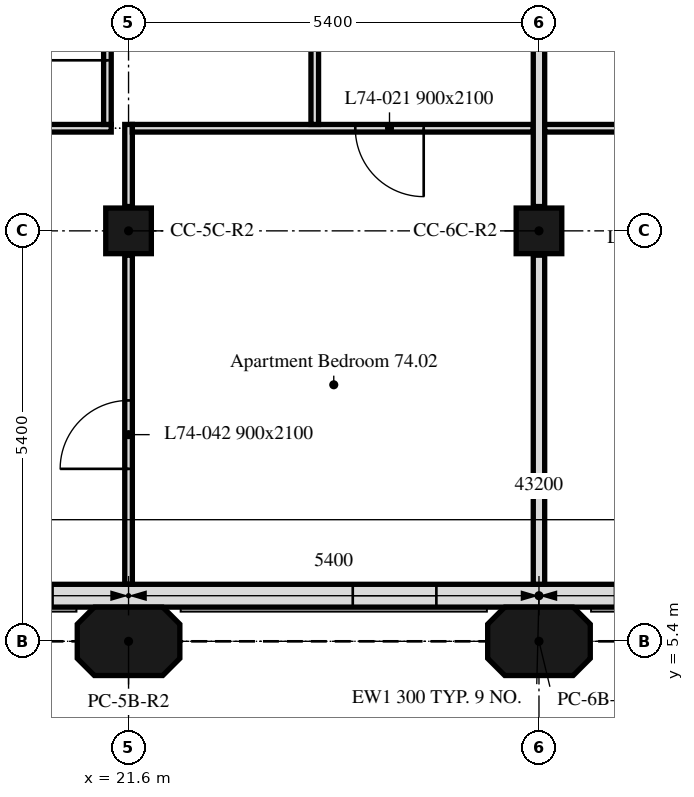
"""IFC4 building model, lengths in metres.
Left out: names, types, materials, properties, quantities, classifications, styles, units other than length and angle.
Written with IfcOpenShell. Run it as: python <this file> out.ifc"""

import sys

from ifc_helpers import new_model, si_unit, direction, frame, frame_2d, origin, origin_2d, place, context, subcontext, project, spatial, polyline, rectangle, outline, extrude, element, fill, save


model = new_model("IFC4")
c1 = context("Model", 3, precision=1e-05, world=origin(), true_north=direction((0.0, 1.0)))
c2 = subcontext(c1, "Body", "Model", "MODEL_VIEW")
j1 = project(units=[si_unit("LENGTHUNIT", "METRE"), si_unit("PLANEANGLEUNIT", "RADIAN")], contexts=[c1])
p1 = place(None, origin())
s1 = spatial("IfcSite", under=j1, at=p1, CompositionType="ELEMENT")
p2 = place(p1, origin())
s2 = spatial("IfcBuilding", under=s1, at=p2, CompositionType="ELEMENT")
p3 = place(p2, frame((0.0, 0.0, 298.3)))
s3 = spatial("IfcBuildingStorey", under=s2, at=p3, CompositionType="ELEMENT", Elevation=298.3)
for number, where, z_axis, x_axis in (
    (1, (21.6, 5.4, 0.0), (0.0, 0.0, 1.0), (1.0, 0.0, 0.0)),
    (2, (27.0, 5.4, 0.0), (0.0, 0.0, 1.0), (1.0, 0.0, 0.0)),
):
    element("IfcColumn", number, at=place(p3, frame(where, z_axis=z_axis, x_axis=x_axis)), inside=s3, PredefinedType="COLUMN", context=c2, shape_type="SweptSolid", body=[
        extrude(outline(polyline([(-0.45, -0.45), (0.45, -0.45), (0.675, -0.225), (0.675, 0.225), (0.45, 0.45), (-0.45, 0.45), (-0.675, 0.225), (-0.675, -0.225), (-0.45, -0.45)])), origin(), (0.0, 0.0, 1.0), 3.0),
    ])
for number, where, z_axis, x_axis in (
    (3, (21.6, 10.8, 0.0), (0.0, 0.0, 1.0), (1.0, 0.0, 0.0)),
    (4, (27.0, 10.8, 0.0), (0.0, 0.0, 1.0), (1.0, 0.0, 0.0)),
):
    element("IfcColumn", number, at=place(p3, frame(where, z_axis=z_axis, x_axis=x_axis)), inside=s3, PredefinedType="COLUMN", context=c2, shape_type="SweptSolid", body=[
        extrude(rectangle(XDim=0.6, YDim=0.6, at=origin_2d()), origin(), (0.0, 0.0, 1.0), 3.0),
    ])
p4 = place(p3, frame((10.986, 6.0, 0.0), z_axis=(0.0, 0.0, 1.0), x_axis=(1.0, 0.0, 0.0)))
e5 = element("IfcWall", 5, at=p4, inside=s3, PredefinedType="SOLIDWALL", context=c2, shape_type="SweptSolid", body=[
    extrude(rectangle(XDim=32.027, YDim=0.3, at=frame_2d((16.014, 0.0))), origin(), (0.0, 0.0, 1.0), 3.0),
])
p5 = place(p4, frame((2.764, 0.0, 0.9)))
e6 = element("IfcOpeningElement", 6, at=p5, cuts=e5, PredefinedType="OPENING", context=c2, shape_type="SweptSolid", body=[
    extrude(rectangle(XDim=1.1, YDim=1.7, at=frame_2d((0.55, 0.85))), frame((0.0, 0.16, 0.0), z_axis=(0.0, -1.0, 0.0), x_axis=(1.0, 0.0, 0.0)), (0.0, 0.0, 1.0), 0.32),
])
p6 = place(p4, frame((6.214, 0.0, 0.9)))
e7 = element("IfcOpeningElement", 7, at=p6, cuts=e5, PredefinedType="OPENING", context=c2, shape_type="SweptSolid", body=[
    extrude(rectangle(XDim=3.4, YDim=1.7, at=frame_2d((1.7, 0.85))), frame((0.0, 0.16, 0.0), z_axis=(0.0, -1.0, 0.0), x_axis=(1.0, 0.0, 0.0)), (0.0, 0.0, 1.0), 0.32),
])
p7 = place(p4, frame((13.564, 0.0, 0.9)))
e8 = element("IfcOpeningElement", 8, at=p7, cuts=e5, PredefinedType="OPENING", context=c2, shape_type="SweptSolid", body=[
    extrude(rectangle(XDim=1.1, YDim=1.7, at=frame_2d((0.55, 0.85))), frame((0.0, 0.16, 0.0), z_axis=(0.0, -1.0, 0.0), x_axis=(1.0, 0.0, 0.0)), (0.0, 0.0, 1.0), 0.32),
])
p8 = place(p4, frame((17.014, 0.0, 0.9)))
e9 = element("IfcOpeningElement", 9, at=p8, cuts=e5, PredefinedType="OPENING", context=c2, shape_type="SweptSolid", body=[
    extrude(rectangle(XDim=3.4, YDim=1.7, at=frame_2d((1.7, 0.85))), frame((0.0, 0.16, 0.0), z_axis=(0.0, -1.0, 0.0), x_axis=(1.0, 0.0, 0.0)), (0.0, 0.0, 1.0), 0.32),
])
p9 = place(p4, frame((24.364, 0.0, 0.9)))
e10 = element("IfcOpeningElement", 10, at=p9, cuts=e5, PredefinedType="OPENING", context=c2, shape_type="SweptSolid", body=[
    extrude(rectangle(XDim=1.1, YDim=1.7, at=frame_2d((0.55, 0.85))), frame((0.0, 0.16, 0.0), z_axis=(0.0, -1.0, 0.0), x_axis=(1.0, 0.0, 0.0)), (0.0, 0.0, 1.0), 0.32),
])
p10 = place(p4, frame((27.814, 0.0, 0.9)))
e11 = element("IfcOpeningElement", 11, at=p10, cuts=e5, PredefinedType="OPENING", context=c2, shape_type="SweptSolid", body=[
    extrude(rectangle(XDim=3.4, YDim=1.7, at=frame_2d((1.7, 0.85))), frame((0.0, 0.16, 0.0), z_axis=(0.0, -1.0, 0.0), x_axis=(1.0, 0.0, 0.0)), (0.0, 0.0, 1.0), 0.32),
])
p11 = place(p3, frame((21.6, 6.151, 0.0), z_axis=(0.0, 0.0, 1.0), x_axis=(0.0, 1.0, 0.0)))
e12 = element("IfcWall", 12, at=p11, inside=s3, PredefinedType="PARTITIONING", context=c2, shape_type="SweptSolid", body=[
    extrude(rectangle(XDim=4.329, YDim=0.1, at=frame_2d((2.165, 0.0))), origin(), (0.0, 0.0, 1.0), 3.0),
])
p12 = place(p11, frame((1.518, 0.0, 0.0)))
e13 = element("IfcOpeningElement", 13, at=p12, cuts=e12, PredefinedType="OPENING", context=c2, shape_type="SweptSolid", body=[
    extrude(rectangle(XDim=0.9, YDim=2.1, at=frame_2d((0.45, 1.05))), frame((0.0, 0.05, 0.0), z_axis=(0.0, -1.0, 0.0), x_axis=(1.0, 0.0, 0.0)), (0.0, 0.0, 1.0), 0.1),
])
p13 = place(p3, frame((21.6, 11.12, 0.0), z_axis=(0.0, 0.0, 1.0), x_axis=(0.0, 1.0, 0.0)))
e14 = element("IfcWall", 14, at=p13, inside=s3, PredefinedType="PARTITIONING", context=c2, shape_type="SweptSolid", body=[
    extrude(rectangle(XDim=1.08, YDim=0.1, at=frame_2d((0.54, 0.0))), origin(), (0.0, 0.0, 1.0), 3.0),
])
p14 = place(p3, frame((21.372, 12.15, 0.0), z_axis=(0.0, 0.0, 1.0), x_axis=(-1.0, 0.0, 0.0)))
e15 = element("IfcWall", 15, at=p14, inside=s3, PredefinedType="PARTITIONING", context=c2, shape_type="SweptSolid", body=[
    extrude(rectangle(XDim=5.097, YDim=0.1, at=frame_2d((2.549, 0.0))), origin(), (0.0, 0.0, 1.0), 3.0),
])
p15 = place(p14, frame((3.1, 0.0, 0.0)))
e16 = element("IfcOpeningElement", 16, at=p15, cuts=e15, PredefinedType="OPENING", context=c2, shape_type="SweptSolid", body=[
    extrude(rectangle(XDim=0.9, YDim=2.1, at=frame_2d((0.45, 1.05))), frame((0.0, 0.05, 0.0), z_axis=(0.0, -1.0, 0.0), x_axis=(1.0, 0.0, 0.0)), (0.0, 0.0, 1.0), 0.1),
])
p16 = place(p14, frame((1.6, 0.0, 0.0)))
e17 = element("IfcOpeningElement", 17, at=p16, cuts=e15, PredefinedType="OPENING", context=c2, shape_type="SweptSolid", body=[
    extrude(rectangle(XDim=0.9, YDim=2.1, at=frame_2d((0.45, 1.05))), frame((0.0, 0.05, 0.0), z_axis=(0.0, -1.0, 0.0), x_axis=(1.0, 0.0, 0.0)), (0.0, 0.0, 1.0), 0.1),
])
p17 = place(p3, frame((27.0, 6.151, 0.0), z_axis=(0.0, 0.0, 1.0), x_axis=(0.0, 1.0, 0.0)))
e18 = element("IfcWall", 18, at=p17, inside=s3, PredefinedType="PARTITIONING", context=c2, shape_type="SweptSolid", body=[
    extrude(rectangle(XDim=4.329, YDim=0.15, at=frame_2d((2.165, 0.0))), origin(), (0.0, 0.0, 1.0), 3.0),
])
p18 = place(p3, frame((26.925, 12.15, 0.0), z_axis=(0.0, 0.0, 1.0), x_axis=(-1.0, 0.0, 0.0)))
e19 = element("IfcWall", 19, at=p18, inside=s3, PredefinedType="PARTITIONING", context=c2, shape_type="SweptSolid", body=[
    extrude(rectangle(XDim=5.275, YDim=0.1, at=frame_2d((2.638, 0.0))), origin(), (0.0, 0.0, 1.0), 3.0),
])
p19 = place(p18, frame((1.442, 0.0, 0.0)))
e20 = element("IfcOpeningElement", 20, at=p19, cuts=e19, PredefinedType="OPENING", context=c2, shape_type="SweptSolid", body=[
    extrude(rectangle(XDim=0.9, YDim=2.1, at=frame_2d((0.45, 1.05))), frame((0.0, 0.05, 0.0), z_axis=(0.0, -1.0, 0.0), x_axis=(1.0, 0.0, 0.0)), (0.0, 0.0, 1.0), 0.1),
])
p20 = place(p3, frame((21.322, 12.2, 0.0), z_axis=(0.0, 0.0, 1.0), x_axis=(0.0, 1.0, 0.0)))
e21 = element("IfcWall", 21, at=p20, inside=s3, PredefinedType="PARTITIONING", context=c2, shape_type="SweptSolid", body=[
    extrude(rectangle(XDim=2.125, YDim=0.1, at=frame_2d((1.062, 0.0))), origin(), (0.0, 0.0, 1.0), 3.0),
])
p21 = place(p20, frame((0.844, 0.0, 0.0)))
e22 = element("IfcOpeningElement", 22, at=p21, cuts=e21, PredefinedType="OPENING", context=c2, shape_type="SweptSolid", body=[
    extrude(rectangle(XDim=0.9, YDim=2.1, at=frame_2d((0.45, 1.05))), frame((0.0, 0.05, 0.0), z_axis=(0.0, -1.0, 0.0), x_axis=(1.0, 0.0, 0.0)), (0.0, 0.0, 1.0), 0.1),
])
p22 = place(p3, frame((24.05, 12.2, 0.0), z_axis=(0.0, 0.0, 1.0), x_axis=(0.0, 1.0, 0.0)))
e23 = element("IfcWall", 23, at=p22, inside=s3, PredefinedType="PARTITIONING", context=c2, shape_type="SweptSolid", body=[
    extrude(rectangle(XDim=2.125, YDim=0.1, at=frame_2d((1.062, 0.0))), origin(), (0.0, 0.0, 1.0), 3.0),
])
p23 = place(p3, frame((27.0, 11.12, 0.0), z_axis=(0.0, 0.0, 1.0), x_axis=(0.0, 1.0, 0.0)))
e24 = element("IfcWall", 24, at=p23, inside=s3, PredefinedType="PARTITIONING", context=c2, shape_type="SweptSolid", body=[
    extrude(rectangle(XDim=3.205, YDim=0.15, at=frame_2d((1.603, 0.0))), origin(), (0.0, 0.0, 1.0), 3.0),
])
p24 = place(p3, frame((32.325, 12.15, 0.0), z_axis=(0.0, 0.0, 1.0), x_axis=(-1.0, 0.0, 0.0)))
e25 = element("IfcWall", 25, at=p24, inside=s3, PredefinedType="PARTITIONING", context=c2, shape_type="SweptSolid", body=[
    extrude(rectangle(XDim=5.25, YDim=0.1, at=frame_2d((2.625, 0.0))), origin(), (0.0, 0.0, 1.0), 3.0),
])
p25 = place(p24, frame((3.0, 0.0, 0.0)))
e26 = element("IfcOpeningElement", 26, at=p25, cuts=e25, PredefinedType="OPENING", context=c2, shape_type="SweptSolid", body=[
    extrude(rectangle(XDim=0.9, YDim=2.1, at=frame_2d((0.45, 1.05))), frame((0.0, 0.05, 0.0), z_axis=(0.0, -1.0, 0.0), x_axis=(1.0, 0.0, 0.0)), (0.0, 0.0, 1.0), 0.1),
])
p26 = place(p24, frame((1.5, 0.0, 0.0)))
e27 = element("IfcOpeningElement", 27, at=p26, cuts=e25, PredefinedType="OPENING", context=c2, shape_type="SweptSolid", body=[
    extrude(rectangle(XDim=0.9, YDim=2.1, at=frame_2d((0.45, 1.05))), frame((0.0, 0.05, 0.0), z_axis=(0.0, -1.0, 0.0), x_axis=(1.0, 0.0, 0.0)), (0.0, 0.0, 1.0), 0.1),
])
p27 = place(p7, origin())
e28 = element("IfcWindow", 28, at=p27, inside=s3, PartitioningType="SINGLE_PANEL", PredefinedType="WINDOW", context=c2, shape_type="SweptSolid", body=[
    extrude(rectangle(XDim=1.1, YDim=1.7, at=frame_2d((0.55, 0.85))), frame((0.0, 0.03, 0.0), z_axis=(0.0, -1.0, 0.0), x_axis=(1.0, 0.0, 0.0)), (0.0, 0.0, 1.0), 0.06),
])
fill(e8, e28)
p28 = place(p19, origin())
e29 = element("IfcDoor", 29, at=p28, inside=s3, OperationType="SINGLE_SWING_LEFT", PredefinedType="DOOR", context=c2, shape_type="SweptSolid", body=[
    extrude(rectangle(XDim=0.9, YDim=2.1, at=frame_2d((0.45, 1.05))), frame((0.0, 0.025, 0.0), z_axis=(0.0, -1.0, 0.0), x_axis=(1.0, 0.0, 0.0)), (0.0, 0.0, 1.0), 0.05),
])
fill(e20, e29)
p29 = place(p21, origin())
e30 = element("IfcDoor", 30, at=p29, inside=s3, OperationType="SINGLE_SWING_LEFT", PredefinedType="DOOR", context=c2, shape_type="SweptSolid", body=[
    extrude(rectangle(XDim=0.9, YDim=2.1, at=frame_2d((0.45, 1.05))), frame((0.0, 0.025, 0.0), z_axis=(0.0, -1.0, 0.0), x_axis=(1.0, 0.0, 0.0)), (0.0, 0.0, 1.0), 0.05),
])
fill(e22, e30)
p30 = place(p12, origin())
e31 = element("IfcDoor", 31, at=p30, inside=s3, OperationType="SINGLE_SWING_RIGHT", PredefinedType="DOOR", context=c2, shape_type="SweptSolid", body=[
    extrude(rectangle(XDim=0.9, YDim=2.1, at=frame_2d((0.45, 1.05))), frame((0.0, 0.025, 0.0), z_axis=(0.0, -1.0, 0.0), x_axis=(1.0, 0.0, 0.0)), (0.0, 0.0, 1.0), 0.05),
])
fill(e13, e31)
save(model, sys.argv[1])
